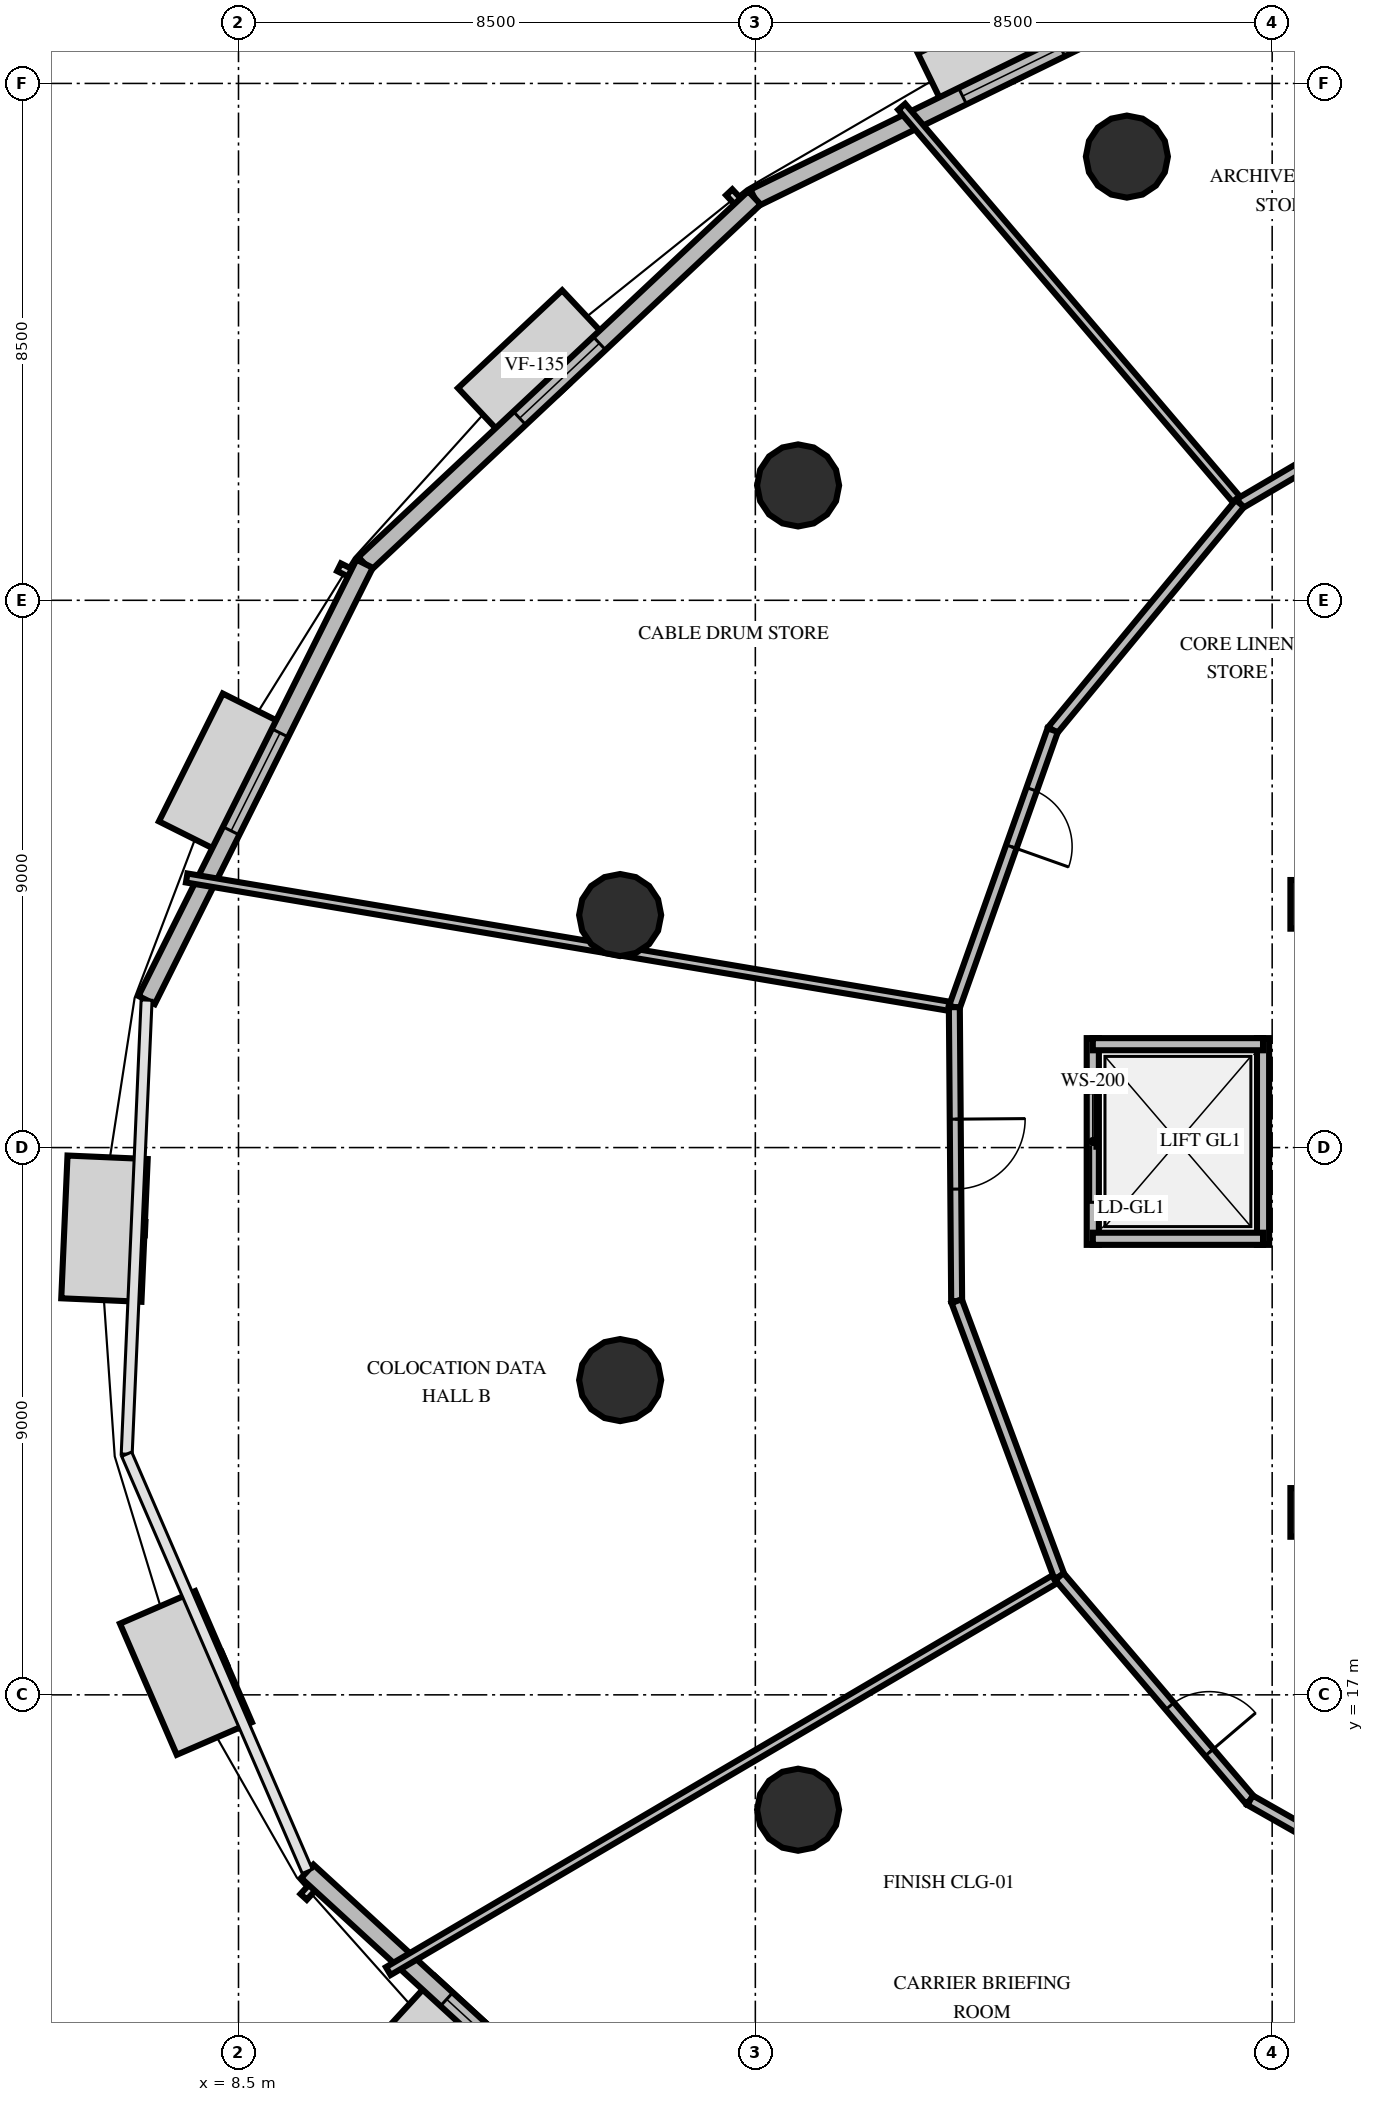
"""IFC4 building model, lengths in metres.
Left out: names, types, materials, properties, quantities, classifications, styles, units other than length and angle.
Written with IfcOpenShell. Run it as: python <this file> out.ifc"""

import sys

from ifc_helpers import new_model, si_unit, direction, frame, frame_2d, origin, origin_2d, place, context, subcontext, project, spatial, rectangle, circle, extrude, element, fill, save


model = new_model("IFC4")
c1 = context("Model", 3, precision=1e-05, world=origin(), true_north=direction((0.0, 1.0)))
c2 = subcontext(c1, "Body", "Model", "MODEL_VIEW")
j1 = project(units=[si_unit("LENGTHUNIT", "METRE"), si_unit("PLANEANGLEUNIT", "RADIAN")], contexts=[c1])
p1 = place(None, origin())
s1 = spatial("IfcSite", under=j1, at=p1, CompositionType="ELEMENT")
p2 = place(p1, origin())
s2 = spatial("IfcBuilding", under=s1, at=p2, CompositionType="ELEMENT")
p3 = place(p2, frame((0.0, 0.0, 76.2)))
s3 = spatial("IfcBuildingStorey", under=s2, at=p3, CompositionType="ELEMENT", Elevation=76.2)
for number, where, z_axis, x_axis in (
    (1, (26.2, 20.0, 0.0), (0.0, 0.0, 1.0), (1.0, 0.0, 0.0)),
    (2, (26.2, 30.0, 0.0), (0.0, 0.0, 1.0), (1.0, 0.0, 0.0)),
):
    element("IfcColumn", number, at=place(p3, frame(where, z_axis=z_axis, x_axis=x_axis)), inside=s3, PredefinedType="PILASTER", context=c2, shape_type="SweptSolid", body=[
        extrude(rectangle(XDim=0.8, YDim=0.8, at=origin_2d()), origin(), (0.0, 0.0, 1.0), 4.2),
    ])
for number, where, z_axis, x_axis in (
    (3, (23.111, 42.297, 0.0), (0.0, 0.0, 1.0), (1.0, 0.0, 0.0)),
    (4, (17.703, 36.889, 0.0), (0.0, 0.0, 1.0), (1.0, 0.0, 0.0)),
    (5, (14.777, 29.824, 0.0), (0.0, 0.0, 1.0), (1.0, 0.0, 0.0)),
    (6, (14.777, 22.176, 0.0), (0.0, 0.0, 1.0), (1.0, 0.0, 0.0)),
    (7, (17.703, 15.111, 0.0), (0.0, 0.0, 1.0), (1.0, 0.0, 0.0)),
):
    element("IfcColumn", number, at=place(p3, frame(where, z_axis=z_axis, x_axis=x_axis)), inside=s3, PredefinedType="COLUMN", context=c2, shape_type="SweptSolid", body=[
        extrude(circle(Radius=0.675, at=origin_2d()), origin(), (0.0, 0.0, 1.0), 4.2),
    ])
p4 = place(p3, frame((25.448, 45.753, 0.0), z_axis=(0.0, 0.0, 1.0), x_axis=(-0.898541129578, -0.438889323699, 0.0)))
e8 = element("IfcWall", 8, at=p4, inside=s3, PredefinedType="SOLIDWALL", context=c2, shape_type="SweptSolid", body=[
    extrude(rectangle(XDim=9.419, YDim=0.3, at=frame_2d((4.709, 0.0))), origin(), (0.0, 0.0, 1.0), 3.0),
])
p5 = place(p4, frame((3.809, 0.0, 0.8)))
e9 = element("IfcOpeningElement", 9, at=p5, cuts=e8, PredefinedType="OPENING", context=c2, shape_type="SweptSolid", body=[
    extrude(rectangle(XDim=1.8, YDim=1.95, at=frame_2d((0.9, 0.975))), frame((0.0, 0.16, 0.0), z_axis=(0.0, -1.0, 0.0), x_axis=(1.0, 0.0, 0.0)), (0.0, 0.0, 1.0), 0.32),
])
p6 = place(p3, frame((16.985, 41.619, 0.0), z_axis=(0.0, 0.0, 1.0), x_axis=(-0.729132694963, -0.684372349775, 0.0)))
e10 = element("IfcWall", 10, at=p6, inside=s3, PredefinedType="SOLIDWALL", context=c2, shape_type="SweptSolid", body=[
    extrude(rectangle(XDim=8.792, YDim=0.3, at=frame_2d((4.396, 0.0))), origin(), (0.0, 0.0, 1.0), 3.0),
])
p7 = place(p6, frame((3.496, 0.0, 0.8)))
e11 = element("IfcOpeningElement", 11, at=p7, cuts=e10, PredefinedType="OPENING", context=c2, shape_type="SweptSolid", body=[
    extrude(rectangle(XDim=1.8, YDim=1.95, at=frame_2d((0.9, 0.975))), frame((0.0, 0.16, 0.0), z_axis=(0.0, -1.0, 0.0), x_axis=(1.0, 0.0, 0.0)), (0.0, 0.0, 1.0), 0.32),
])
p8 = place(p3, frame((10.574, 35.602, 0.0), z_axis=(0.0, 0.0, 1.0), x_axis=(-0.44697009801, -0.894548898319, 0.0)))
e12 = element("IfcWall", 12, at=p8, inside=s3, PredefinedType="SOLIDWALL", context=c2, shape_type="SweptSolid", body=[
    extrude(rectangle(XDim=8.022, YDim=0.3, at=frame_2d((4.011, 0.0))), origin(), (0.0, 0.0, 1.0), 3.0),
])
p9 = place(p8, frame((3.111, 0.0, 0.8)))
e13 = element("IfcOpeningElement", 13, at=p9, cuts=e12, PredefinedType="OPENING", context=c2, shape_type="SweptSolid", body=[
    extrude(rectangle(XDim=1.8, YDim=1.95, at=frame_2d((0.9, 0.975))), frame((0.0, 0.16, 0.0), z_axis=(0.0, -1.0, 0.0), x_axis=(1.0, 0.0, 0.0)), (0.0, 0.0, 1.0), 0.32),
])
p10 = place(p3, frame((9.631, 14.098, 0.0), z_axis=(0.0, 0.0, 1.0), x_axis=(0.736682732999, -0.676238531068, 0.0)))
e14 = element("IfcWall", 14, at=p10, inside=s3, PredefinedType="SOLIDWALL", context=c2, shape_type="SweptSolid", body=[
    extrude(rectangle(XDim=8.022, YDim=0.3, at=frame_2d((4.011, 0.0))), origin(), (0.0, 0.0, 1.0), 3.0),
])
p11 = place(p10, frame((3.111, 0.0, 0.8)))
e15 = element("IfcOpeningElement", 15, at=p11, cuts=e14, PredefinedType="OPENING", context=c2, shape_type="SweptSolid", body=[
    extrude(rectangle(XDim=1.8, YDim=1.95, at=frame_2d((0.9, 0.975))), frame((0.0, 0.16, 0.0), z_axis=(0.0, -1.0, 0.0), x_axis=(1.0, 0.0, 0.0)), (0.0, 0.0, 1.0), 0.32),
])
p12 = place(p3, frame((22.55, 24.4, 0.0), z_axis=(0.0, 0.0, 1.0), x_axis=(0.0, 1.0, 0.0)))
e16 = element("IfcWall", 16, at=p12, inside=s3, PredefinedType="SOLIDWALL", context=c2, shape_type="SweptSolid", body=[
    extrude(rectangle(XDim=3.4, YDim=0.2, at=frame_2d((1.7, 0.0))), origin(), (0.0, 0.0, 1.0), 3.0),
])
p13 = place(p12, frame((0.7, 0.0, 0.0)))
e17 = element("IfcOpeningElement", 17, at=p13, cuts=e16, PredefinedType="OPENING", context=c2, shape_type="SweptSolid", body=[
    extrude(rectangle(XDim=1.8, YDim=2.4, at=frame_2d((0.9, 1.2))), frame((0.0, 0.11, 0.0), z_axis=(0.0, -1.0, 0.0), x_axis=(1.0, 0.0, 0.0)), (0.0, 0.0, 1.0), 0.22),
])
p14 = place(p3, frame((25.35, 24.4, 0.0), z_axis=(0.0, 0.0, 1.0), x_axis=(0.0, 1.0, 0.0)))
e18 = element("IfcWall", 18, at=p14, inside=s3, PredefinedType="SOLIDWALL", context=c2, shape_type="SweptSolid", body=[
    extrude(rectangle(XDim=3.4, YDim=0.2, at=frame_2d((1.7, 0.0))), origin(), (0.0, 0.0, 1.0), 3.0),
])
for number, where, z_axis, x_axis in (
    (19, (22.55, 24.5, 0.0), (0.0, 0.0, 1.0), (1.0, 0.0, 0.0)),
    (20, (22.55, 27.7, 0.0), (0.0, 0.0, 1.0), (1.0, 0.0, 0.0)),
):
    element("IfcWall", number, at=place(p3, frame(where, z_axis=z_axis, x_axis=x_axis)), inside=s3, PredefinedType="SOLIDWALL", context=c2, shape_type="SweptSolid", body=[
        extrude(rectangle(XDim=2.8, YDim=0.2, at=frame_2d((1.4, 0.0))), origin(), (0.0, 0.0, 1.0), 3.0),
    ])
p15 = place(p3, frame((24.969, 36.593, 0.0), z_axis=(0.0, 0.0, 1.0), x_axis=(-0.648805013495, 0.76095469935, 0.0)))
e21 = element("IfcWall", 21, at=p15, inside=s3, PredefinedType="PARTITIONING", context=c2, shape_type="SweptSolid", body=[
    extrude(rectangle(XDim=8.573, YDim=0.15, at=frame_2d((4.286, 0.0))), origin(), (0.0, 0.0, 1.0), 3.0),
])
p16 = place(p3, frame((29.136, 39.043, 0.0), z_axis=(0.0, 0.0, 1.0), x_axis=(-0.862070500673, -0.506788369904, 0.0)))
e22 = element("IfcWall", 22, at=p16, inside=s3, PredefinedType="PARTITIONING", context=c2, shape_type="SweptSolid", body=[
    extrude(rectangle(XDim=4.834, YDim=0.18, at=frame_2d((2.417, 0.0))), origin(), (0.0, 0.0, 1.0), 3.0),
])
p17 = place(p16, frame((1.034, 0.0, 0.0)))
e23 = element("IfcOpeningElement", 23, at=p17, cuts=e22, PredefinedType="OPENING", context=c2, shape_type="SweptSolid", body=[
    extrude(rectangle(XDim=1.0, YDim=2.15, at=frame_2d((0.5, 1.075))), frame((0.0, 0.1, 0.0), z_axis=(0.0, -1.0, 0.0), x_axis=(1.0, 0.0, 0.0)), (0.0, 0.0, 1.0), 0.2),
])
p18 = place(p3, frame((20.273, 28.309, 0.0), z_axis=(0.0, 0.0, 1.0), x_axis=(-0.986140728359, 0.165911011907, 0.0)))
e24 = element("IfcWall", 24, at=p18, inside=s3, PredefinedType="PARTITIONING", context=c2, shape_type="SweptSolid", body=[
    extrude(rectangle(XDim=12.802, YDim=0.15, at=frame_2d((6.401, 0.0))), origin(), (0.0, 0.0, 1.0), 3.0),
])
p19 = place(p3, frame((24.969, 36.593, 0.0), z_axis=(0.0, 0.0, 1.0), x_axis=(-0.636745713157, -0.771073859481, 0.0)))
e25 = element("IfcWall", 25, at=p19, inside=s3, PredefinedType="PARTITIONING", context=c2, shape_type="SweptSolid", body=[
    extrude(rectangle(XDim=4.834, YDim=0.18, at=frame_2d((2.417, 0.0))), origin(), (0.0, 0.0, 1.0), 3.0),
])
p20 = place(p3, frame((21.891, 32.865, 0.0), z_axis=(0.0, 0.0, 1.0), x_axis=(-0.334621083093, -0.942352763433, 0.0)))
e26 = element("IfcWall", 26, at=p20, inside=s3, PredefinedType="PARTITIONING", context=c2, shape_type="SweptSolid", body=[
    extrude(rectangle(XDim=4.834, YDim=0.18, at=frame_2d((2.417, 0.0))), origin(), (0.0, 0.0, 1.0), 3.0),
])
p21 = place(p20, frame((1.034, 0.0, 0.0)))
e27 = element("IfcOpeningElement", 27, at=p21, cuts=e26, PredefinedType="OPENING", context=c2, shape_type="SweptSolid", body=[
    extrude(rectangle(XDim=1.0, YDim=2.15, at=frame_2d((0.5, 1.075))), frame((0.0, 0.1, 0.0), z_axis=(0.0, -1.0, 0.0), x_axis=(1.0, 0.0, 0.0)), (0.0, 0.0, 1.0), 0.2),
])
p22 = place(p3, frame((22.0, 18.946, 0.0), z_axis=(0.0, 0.0, 1.0), x_axis=(-0.862073897638, -0.506782591464, 0.0)))
e28 = element("IfcWall", 28, at=p22, inside=s3, PredefinedType="PARTITIONING", context=c2, shape_type="SweptSolid", body=[
    extrude(rectangle(XDim=12.802, YDim=0.15, at=frame_2d((6.401, 0.0))), origin(), (0.0, 0.0, 1.0), 3.0),
])
p23 = place(p3, frame((20.273, 28.309, 0.0), z_axis=(0.0, 0.0, 1.0), x_axis=(0.007827647661, -0.999969363497, 0.0)))
e29 = element("IfcWall", 29, at=p23, inside=s3, PredefinedType="PARTITIONING", context=c2, shape_type="SweptSolid", body=[
    extrude(rectangle(XDim=4.834, YDim=0.18, at=frame_2d((2.417, 0.0))), origin(), (0.0, 0.0, 1.0), 3.0),
])
p24 = place(p23, frame((1.842, 0.0, 0.0)))
e30 = element("IfcOpeningElement", 30, at=p24, cuts=e29, PredefinedType="OPENING", context=c2, shape_type="SweptSolid", body=[
    extrude(rectangle(XDim=1.15, YDim=2.15, at=frame_2d((0.575, 1.075))), frame((0.0, 0.1, 0.0), z_axis=(0.0, -1.0, 0.0), x_axis=(1.0, 0.0, 0.0)), (0.0, 0.0, 1.0), 0.2),
])
p25 = place(p3, frame((20.311, 23.475, 0.0), z_axis=(0.0, 0.0, 1.0), x_axis=(0.349423780352, -0.936964792148, 0.0)))
e31 = element("IfcWall", 31, at=p25, inside=s3, PredefinedType="PARTITIONING", context=c2, shape_type="SweptSolid", body=[
    extrude(rectangle(XDim=4.834, YDim=0.18, at=frame_2d((2.417, 0.0))), origin(), (0.0, 0.0, 1.0), 3.0),
])
p26 = place(p3, frame((22.0, 18.946, 0.0), z_axis=(0.0, 0.0, 1.0), x_axis=(0.648772052091, -0.760982801662, 0.0)))
e32 = element("IfcWall", 32, at=p26, inside=s3, PredefinedType="PARTITIONING", context=c2, shape_type="SweptSolid", body=[
    extrude(rectangle(XDim=4.834, YDim=0.18, at=frame_2d((2.417, 0.0))), origin(), (0.0, 0.0, 1.0), 3.0),
])
p27 = place(p26, frame((2.801, 0.0, 0.0)))
e33 = element("IfcOpeningElement", 33, at=p27, cuts=e32, PredefinedType="OPENING", context=c2, shape_type="SweptSolid", body=[
    extrude(rectangle(XDim=1.0, YDim=2.15, at=frame_2d((0.5, 1.075))), frame((0.0, 0.1, 0.0), z_axis=(0.0, -1.0, 0.0), x_axis=(1.0, 0.0, 0.0)), (0.0, 0.0, 1.0), 0.2),
])
p28 = place(p3, frame((25.136, 15.267, 0.0), z_axis=(0.0, 0.0, 1.0), x_axis=(0.869944192354, -0.493150182186, 0.0)))
e34 = element("IfcWall", 34, at=p28, inside=s3, PredefinedType="PARTITIONING", context=c2, shape_type="SweptSolid", body=[
    extrude(rectangle(XDim=4.834, YDim=0.18, at=frame_2d((2.417, 0.0))), origin(), (0.0, 0.0, 1.0), 3.0),
])
p29 = place(p5, origin())
e35 = element("IfcWindow", 35, at=p29, inside=s3, PartitioningType="SINGLE_PANEL", PredefinedType="WINDOW", context=c2, shape_type="SweptSolid", body=[
    extrude(rectangle(XDim=1.8, YDim=1.95, at=frame_2d((0.9, 0.975))), frame((0.0, 0.03, 0.0), z_axis=(0.0, -1.0, 0.0), x_axis=(1.0, 0.0, 0.0)), (0.0, 0.0, 1.0), 0.06),
])
fill(e9, e35)
p30 = place(p7, origin())
e36 = element("IfcWindow", 36, at=p30, inside=s3, PartitioningType="SINGLE_PANEL", PredefinedType="WINDOW", context=c2, shape_type="SweptSolid", body=[
    extrude(rectangle(XDim=1.8, YDim=1.95, at=frame_2d((0.9, 0.975))), frame((0.0, 0.03, 0.0), z_axis=(0.0, -1.0, 0.0), x_axis=(1.0, 0.0, 0.0)), (0.0, 0.0, 1.0), 0.06),
])
fill(e11, e36)
p31 = place(p9, origin())
e37 = element("IfcWindow", 37, at=p31, inside=s3, PartitioningType="SINGLE_PANEL", PredefinedType="WINDOW", context=c2, shape_type="SweptSolid", body=[
    extrude(rectangle(XDim=1.8, YDim=1.95, at=frame_2d((0.9, 0.975))), frame((0.0, 0.03, 0.0), z_axis=(0.0, -1.0, 0.0), x_axis=(1.0, 0.0, 0.0)), (0.0, 0.0, 1.0), 0.06),
])
fill(e13, e37)
p32 = place(p11, origin())
e38 = element("IfcWindow", 38, at=p32, inside=s3, PartitioningType="SINGLE_PANEL", PredefinedType="WINDOW", context=c2, shape_type="SweptSolid", body=[
    extrude(rectangle(XDim=1.8, YDim=1.95, at=frame_2d((0.9, 0.975))), frame((0.0, 0.03, 0.0), z_axis=(0.0, -1.0, 0.0), x_axis=(1.0, 0.0, 0.0)), (0.0, 0.0, 1.0), 0.06),
])
fill(e15, e38)
p33 = place(p13, origin())
e39 = element("IfcDoor", 39, at=p33, inside=s3, OperationType="DOUBLE_DOOR_SLIDING", PredefinedType="USERDEFINED", context=c2, shape_type="SweptSolid", body=[
    extrude(rectangle(XDim=1.8, YDim=2.4, at=frame_2d((0.9, 1.2))), frame((0.0, 0.025, 0.0), z_axis=(0.0, -1.0, 0.0), x_axis=(1.0, 0.0, 0.0)), (0.0, 0.0, 1.0), 0.05),
])
fill(e17, e39)
p34 = place(p21, origin())
e40 = element("IfcDoor", 40, at=p34, inside=s3, OperationType="SINGLE_SWING_RIGHT", PredefinedType="DOOR", context=c2, shape_type="SweptSolid", body=[
    extrude(rectangle(XDim=1.0, YDim=2.15, at=frame_2d((0.5, 1.075))), frame((0.0, 0.025, 0.0), z_axis=(0.0, -1.0, 0.0), x_axis=(1.0, 0.0, 0.0)), (0.0, 0.0, 1.0), 0.05),
])
fill(e27, e40)
p35 = place(p24, origin())
e41 = element("IfcDoor", 41, at=p35, inside=s3, OperationType="SINGLE_SWING_LEFT", PredefinedType="DOOR", context=c2, shape_type="SweptSolid", body=[
    extrude(rectangle(XDim=1.15, YDim=2.15, at=frame_2d((0.575, 1.075))), frame((0.0, 0.025, 0.0), z_axis=(0.0, -1.0, 0.0), x_axis=(1.0, 0.0, 0.0)), (0.0, 0.0, 1.0), 0.05),
])
fill(e30, e41)
p36 = place(p27, origin())
e42 = element("IfcDoor", 42, at=p36, inside=s3, OperationType="SINGLE_SWING_RIGHT", PredefinedType="DOOR", context=c2, shape_type="SweptSolid", body=[
    extrude(rectangle(XDim=1.0, YDim=2.15, at=frame_2d((0.5, 1.075))), frame((0.0, 0.025, 0.0), z_axis=(0.0, -1.0, 0.0), x_axis=(1.0, 0.0, 0.0)), (0.0, 0.0, 1.0), 0.05),
])
fill(e33, e42)
save(model, sys.argv[1])
